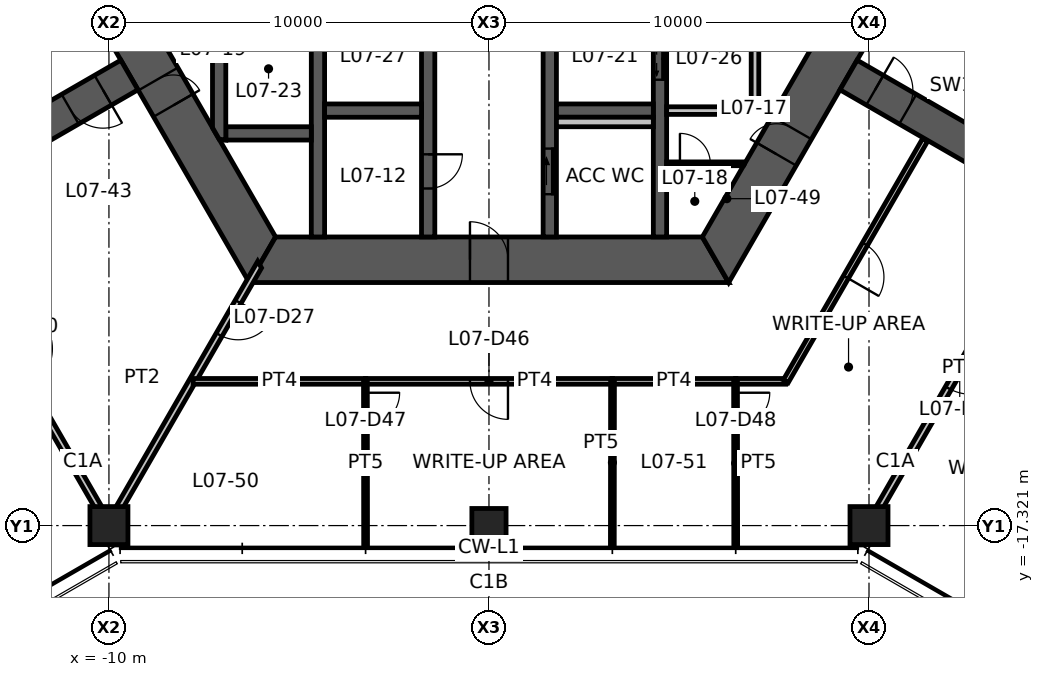
"""IFC4 building model, lengths in metres.
Left out: names, types, materials, properties, quantities, classifications, styles, units other than length and angle.
Written with IfcOpenShell. Run it as: python <this file> out.ifc"""

import sys

from ifc_helpers import new_model, si_unit, direction, frame, frame_2d, origin, origin_2d, place, context, subcontext, project, spatial, polyline, rectangle, hollow_rectangle, outline, extrude, element, fill, save


model = new_model("IFC4")
c1 = context("Model", 3, precision=1e-05, world=origin(), true_north=direction((0.0, 1.0)))
c2 = subcontext(c1, "Body", "Model", "MODEL_VIEW")
j1 = project(units=[si_unit("LENGTHUNIT", "METRE"), si_unit("PLANEANGLEUNIT", "RADIAN")], contexts=[c1])
p1 = place(None, origin())
s1 = spatial("IfcSite", under=j1, at=p1, CompositionType="ELEMENT")
p2 = place(p1, origin())
s2 = spatial("IfcBuilding", under=s1, at=p2, CompositionType="ELEMENT")
p3 = place(p2, frame((0.0, 0.0, 26.8)))
s3 = spatial("IfcBuildingStorey", under=s2, at=p3, CompositionType="ELEMENT", Elevation=26.8)
for number, where, z_axis, x_axis in (
    (1, (-10.0, -17.321, 0.0), (0.0, 0.0, 1.0), (1.0, 0.0, 0.0)),
    (2, (10.0, -17.321, 0.0), (0.0, 0.0, 1.0), (1.0, 0.0, 0.0)),
):
    element("IfcColumn", number, at=place(p3, frame(where, z_axis=z_axis, x_axis=x_axis)), inside=s3, PredefinedType="COLUMN", context=c2, shape_type="SweptSolid", body=[
        extrude(hollow_rectangle(XDim=1.0, YDim=1.0, WallThickness=0.06, at=origin_2d()), origin(), (0.0, 0.0, 1.0), 4.2),
    ])
p4 = place(p3, frame((0.0, -17.321, 0.0), z_axis=(0.0, 0.0, 1.0), x_axis=(1.0, 0.0, 0.0)))
e3 = element("IfcColumn", 3, at=p4, inside=s3, PredefinedType="COLUMN", context=c2, shape_type="SweptSolid", body=[
    extrude(hollow_rectangle(XDim=0.9, YDim=0.9, WallThickness=0.05, at=origin_2d()), origin(), (0.0, 0.0, 1.0), 4.2),
])
p5 = place(p3, frame((-11.922, 0.0, 0.0), z_axis=(0.0, 0.0, 1.0), x_axis=(0.500004296715, -0.866022923061, 0.0)))
e4 = element("IfcWall", 4, at=p5, inside=s3, PredefinedType="SHEAR", context=c2, shape_type="SweptSolid", body=[
    extrude(outline(polyline([(-0.346, -0.6), (6.431, -0.6), (7.231, -0.6), (12.269, -0.6), (11.576, 0.6), (7.231, 0.6), (6.431, 0.6), (0.346, 0.6), (-0.346, -0.6)])), origin(), (0.0, 0.0, 1.0), 4.2),
])
p6 = place(p5, frame((6.431, 0.0, 0.0)))
e5 = element("IfcOpeningElement", 5, at=p6, cuts=e4, PredefinedType="OPENING", context=c2, shape_type="SweptSolid", body=[
    extrude(rectangle(XDim=0.8, YDim=2.1, at=frame_2d((0.4, 1.05))), frame((0.0, 0.61, 0.0), z_axis=(0.0, -1.0, 0.0), x_axis=(1.0, 0.0, 0.0)), (0.0, 0.0, 1.0), 1.22),
])
p7 = place(p3, frame((-5.961, -10.325, 0.0), z_axis=(0.0, 0.0, 1.0), x_axis=(1.0, 0.0, 0.0)))
e6 = element("IfcWall", 6, at=p7, inside=s3, PredefinedType="SHEAR", context=c2, shape_type="SweptSolid", body=[
    extrude(outline(polyline([(-0.346, -0.6), (5.461, -0.6), (6.461, -0.6), (12.269, -0.6), (11.576, 0.6), (6.461, 0.6), (5.461, 0.6), (0.346, 0.6), (-0.346, -0.6)])), origin(), (0.0, 0.0, 1.0), 4.2),
])
p8 = place(p7, frame((5.461, 0.0, 0.0)))
e7 = element("IfcOpeningElement", 7, at=p8, cuts=e6, PredefinedType="OPENING", context=c2, shape_type="SweptSolid", body=[
    extrude(rectangle(XDim=1.0, YDim=2.1, at=frame_2d((0.5, 1.05))), frame((0.0, 0.61, 0.0), z_axis=(0.0, -1.0, 0.0), x_axis=(1.0, 0.0, 0.0)), (0.0, 0.0, 1.0), 1.22),
])
p9 = place(p3, frame((5.961, -10.325, 0.0), z_axis=(0.0, 0.0, 1.0), x_axis=(0.500004296715, 0.866022923061, 0.0)))
e8 = element("IfcWall", 8, at=p9, inside=s3, PredefinedType="SHEAR", context=c2, shape_type="SweptSolid", body=[
    extrude(outline(polyline([(-0.346, -0.6), (3.208, -0.6), (4.009, -0.6), (12.269, -0.6), (11.576, 0.6), (4.009, 0.6), (3.208, 0.6), (0.346, 0.6), (-0.346, -0.6)])), origin(), (0.0, 0.0, 1.0), 4.2),
])
p10 = place(p9, frame((3.208, 0.0, 0.0)))
e9 = element("IfcOpeningElement", 9, at=p10, cuts=e8, PredefinedType="OPENING", context=c2, shape_type="SweptSolid", body=[
    extrude(rectangle(XDim=0.8, YDim=2.1, at=frame_2d((0.4, 1.05))), frame((0.0, 0.61, 0.0), z_axis=(0.0, -1.0, 0.0), x_axis=(1.0, 0.0, 0.0)), (0.0, 0.0, 1.0), 1.22),
])
p11 = place(p3, frame((-9.461, -5.462, 0.0), z_axis=(0.0, 0.0, 1.0), x_axis=(-0.866019116917, -0.500010889016, 0.0)))
e10 = element("IfcWall", 10, at=p11, inside=s3, PredefinedType="SHEAR", context=c2, shape_type="SweptSolid", body=[
    extrude(rectangle(XDim=7.595, YDim=0.9, at=frame_2d((3.798, 0.0))), origin(), (0.0, 0.0, 1.0), 4.2),
])
p12 = place(p11, frame((0.8, 0.0, 0.0)))
e11 = element("IfcOpeningElement", 11, at=p12, cuts=e10, PredefinedType="OPENING", context=c2, shape_type="SweptSolid", body=[
    extrude(rectangle(XDim=1.0, YDim=2.1, at=frame_2d((0.5, 1.05))), frame((0.0, 0.46, 0.0), z_axis=(0.0, -1.0, 0.0), x_axis=(1.0, 0.0, 0.0)), (0.0, 0.0, 1.0), 0.92),
])
p13 = place(p3, frame((9.461, -5.462, 0.0), z_axis=(0.0, 0.0, 1.0), x_axis=(0.866019116917, -0.500010889016, 0.0)))
e12 = element("IfcWall", 12, at=p13, inside=s3, PredefinedType="SHEAR", context=c2, shape_type="SweptSolid", body=[
    extrude(rectangle(XDim=7.595, YDim=0.9, at=frame_2d((3.798, 0.0))), origin(), (0.0, 0.0, 1.0), 4.2),
])
p14 = place(p13, frame((0.8, 0.0, 0.0)))
e13 = element("IfcOpeningElement", 13, at=p14, cuts=e12, PredefinedType="OPENING", context=c2, shape_type="SweptSolid", body=[
    extrude(rectangle(XDim=1.0, YDim=2.1, at=frame_2d((0.5, 1.05))), frame((0.0, 0.46, 0.0), z_axis=(0.0, -1.0, 0.0), x_axis=(1.0, 0.0, 0.0)), (0.0, 0.0, 1.0), 0.92),
])
p15 = place(p3, frame((-1.6, -3.775, 0.0), z_axis=(0.0, 0.0, 1.0), x_axis=(0.0, -1.0, 0.0)))
e14 = element("IfcWall", 14, at=p15, inside=s3, PredefinedType="SHEAR", context=c2, shape_type="SweptSolid", body=[
    extrude(rectangle(XDim=5.95, YDim=0.35, at=frame_2d((2.975, 0.0))), origin(), (0.0, 0.0, 1.0), 4.2),
])
p16 = place(p15, frame((3.775, 0.0, 0.0)))
e15 = element("IfcOpeningElement", 15, at=p16, cuts=e14, PredefinedType="OPENING", context=c2, shape_type="SweptSolid", body=[
    extrude(rectangle(XDim=0.9, YDim=2.1, at=frame_2d((0.45, 1.05))), frame((0.0, 0.185, 0.0), z_axis=(0.0, -1.0, 0.0), x_axis=(1.0, 0.0, 0.0)), (0.0, 0.0, 1.0), 0.37),
])
p17 = place(p3, frame((1.6, -3.775, 0.0), z_axis=(0.0, 0.0, 1.0), x_axis=(0.0, -1.0, 0.0)))
e16 = element("IfcWall", 16, at=p17, inside=s3, PredefinedType="SHEAR", context=c2, shape_type="SweptSolid", body=[
    extrude(rectangle(XDim=5.95, YDim=0.35, at=frame_2d((2.975, 0.0))), origin(), (0.0, 0.0, 1.0), 4.2),
])
p18 = place(p17, frame((3.625, 0.0, 0.0)))
e17 = element("IfcOpeningElement", 17, at=p18, cuts=e16, PredefinedType="OPENING", context=c2, shape_type="SweptSolid", body=[
    extrude(rectangle(XDim=1.2, YDim=2.1, at=frame_2d((0.6, 1.05))), frame((0.0, 0.185, 0.0), z_axis=(0.0, -1.0, 0.0), x_axis=(1.0, 0.0, 0.0)), (0.0, 0.0, 1.0), 0.37),
])
p19 = place(p3, frame((-4.5, -3.775, 0.0), z_axis=(0.0, 0.0, 1.0), x_axis=(0.0, -1.0, 0.0)))
e18 = element("IfcWall", 18, at=p19, inside=s3, PredefinedType="SHEAR", context=c2, shape_type="SweptSolid", body=[
    extrude(rectangle(XDim=5.95, YDim=0.35, at=frame_2d((2.975, 0.0))), origin(), (0.0, 0.0, 1.0), 4.2),
])
p20 = place(p3, frame((4.5, -3.775, 0.0), z_axis=(0.0, 0.0, 1.0), x_axis=(0.0, -1.0, 0.0)))
e19 = element("IfcWall", 19, at=p20, inside=s3, PredefinedType="SHEAR", context=c2, shape_type="SweptSolid", body=[
    extrude(rectangle(XDim=5.95, YDim=0.35, at=frame_2d((2.975, 0.0))), origin(), (0.0, 0.0, 1.0), 4.2),
])
p21 = place(p20, frame((0.712, 0.0, 0.0)))
e20 = element("IfcOpeningElement", 20, at=p21, cuts=e19, PredefinedType="OPENING", context=c2, shape_type="SweptSolid", body=[
    extrude(rectangle(XDim=1.1, YDim=2.1, at=frame_2d((0.55, 1.05))), frame((0.0, 0.185, 0.0), z_axis=(0.0, -1.0, 0.0), x_axis=(1.0, 0.0, 0.0)), (0.0, 0.0, 1.0), 0.37),
])
for number, where, z_axis, x_axis in (
    (21, (-4.325, -6.4, 0.0), (0.0, 0.0, 1.0), (1.0, 0.0, 0.0)),
    (22, (1.775, -6.4, 0.0), (0.0, 0.0, 1.0), (1.0, 0.0, 0.0)),
):
    element("IfcWall", number, at=place(p3, frame(where, z_axis=z_axis, x_axis=x_axis)), inside=s3, PredefinedType="SHEAR", context=c2, shape_type="SweptSolid", body=[
        extrude(rectangle(XDim=2.55, YDim=0.35, at=frame_2d((1.275, 0.0))), origin(), (0.0, 0.0, 1.0), 4.2),
    ])
p22 = place(p3, frame((-6.925, -7.0, 0.0), z_axis=(0.0, 0.0, 1.0), x_axis=(1.0, 0.0, 0.0)))
e23 = element("IfcWall", 23, at=p22, inside=s3, PredefinedType="SHEAR", context=c2, shape_type="SweptSolid", body=[
    extrude(rectangle(XDim=2.25, YDim=0.35, at=frame_2d((1.125, 0.0))), origin(), (0.0, 0.0, 1.0), 4.2),
])
p23 = place(p3, frame((-7.1, -3.775, 0.0), z_axis=(0.0, 0.0, 1.0), x_axis=(0.0, -1.0, 0.0)))
e24 = element("IfcWall", 24, at=p23, inside=s3, PredefinedType="SHEAR", context=c2, shape_type="SweptSolid", body=[
    extrude(outline(polyline([(0.0, -0.175), (3.074, -0.175), (3.377, 0.0), (3.4, 0.175), (0.0, 0.175), (0.0, -0.175)])), origin(), (0.0, 0.0, 1.0), 4.2),
])
p24 = place(p3, frame((4.675, -6.4, 0.0), z_axis=(0.0, 0.0, 1.0), x_axis=(1.0, 0.0, 0.0)))
e25 = element("IfcWall", 25, at=p24, inside=s3, PredefinedType="STANDARD", context=c2, shape_type="SweptSolid", body=[
    extrude(rectangle(XDim=2.425, YDim=0.2, at=frame_2d((1.212, 0.0))), origin(), (0.0, 0.0, 1.0), 4.2),
])
p25 = place(p3, frame((7.0, -3.775, 0.0), z_axis=(0.0, 0.0, 1.0), x_axis=(0.0, -1.0, 0.0)))
e26 = element("IfcWall", 26, at=p25, inside=s3, PredefinedType="STANDARD", context=c2, shape_type="SweptSolid", body=[
    extrude(rectangle(XDim=2.525, YDim=0.2, at=frame_2d((1.263, 0.0))), origin(), (0.0, 0.0, 1.0), 4.2),
])
p26 = place(p3, frame((1.775, -6.7, 0.0), z_axis=(0.0, 0.0, 1.0), x_axis=(1.0, 0.0, 0.0)))
e27 = element("IfcWall", 27, at=p26, inside=s3, PredefinedType="PLUMBINGWALL", context=c2, shape_type="SweptSolid", body=[
    extrude(rectangle(XDim=2.55, YDim=0.25, at=frame_2d((1.275, 0.0))), origin(), (0.0, 0.0, 1.0), 4.2),
])
p27 = place(p3, frame((4.675, -7.8, 0.0), z_axis=(0.0, 0.0, 1.0), x_axis=(1.0, 0.0, 0.0)))
e28 = element("IfcWall", 28, at=p27, inside=s3, PredefinedType="PARTITIONING", context=c2, shape_type="SweptSolid", body=[
    extrude(outline(polyline([(0.0, -0.05), (0.35, -0.05), (1.15, -0.05), (2.022, -0.05), (2.051, 0.0), (2.057, 0.05), (1.15, 0.05), (0.35, 0.05), (0.0, 0.05), (0.0, -0.05)])), origin(), (0.0, 0.0, 1.0), 3.23),
])
p28 = place(p27, frame((0.35, 0.0, 0.0)))
e29 = element("IfcOpeningElement", 29, at=p28, cuts=e28, PredefinedType="OPENING", context=c2, shape_type="SweptSolid", body=[
    extrude(rectangle(XDim=0.8, YDim=2.1, at=frame_2d((0.4, 1.05))), frame((0.0, 0.06, 0.0), z_axis=(0.0, -1.0, 0.0), x_axis=(1.0, 0.0, 0.0)), (0.0, 0.0, 1.0), 0.12),
])
p29 = place(p3, frame((-6.035, -10.453, 0.0), z_axis=(0.0, 0.0, 1.0), x_axis=(-0.499993402427, -0.866029212861, 0.0)))
e30 = element("IfcWall", 30, at=p29, inside=s3, PredefinedType="PARTITIONING", context=c2, shape_type="SweptSolid", body=[
    extrude(outline(polyline([(-0.051, -0.087), (1.129, -0.087), (2.129, -0.087), (7.93, -0.087), (7.93, 0.087), (2.129, 0.087), (1.129, 0.087), (0.051, 0.087), (-0.051, -0.087)])), origin(), (0.0, 0.0, 1.0), 3.33),
])
p30 = place(p29, frame((1.129, 0.0, 0.0)))
e31 = element("IfcOpeningElement", 31, at=p30, cuts=e30, PredefinedType="OPENING", context=c2, shape_type="SweptSolid", body=[
    extrude(rectangle(XDim=1.0, YDim=2.1, at=frame_2d((0.5, 1.05))), frame((0.0, 0.098, 0.0), z_axis=(0.0, -1.0, 0.0), x_axis=(1.0, 0.0, 0.0)), (0.0, 0.0, 1.0), 0.195),
])
p31 = place(p3, frame((-14.775, -9.05, 0.0), z_axis=(0.0, 0.0, 1.0), x_axis=(0.499993908199, -0.866028920859, 0.0)))
e32 = element("IfcWall", 32, at=p31, inside=s3, PredefinedType="PARTITIONING", context=c2, shape_type="SweptSolid", body=[
    extrude(rectangle(XDim=9.55, YDim=0.175, at=frame_2d((4.775, 0.0))), origin(), (0.0, 0.0, 1.0), 3.238),
])
p32 = place(p31, frame((4.175, 0.0, 0.0)))
e33 = element("IfcOpeningElement", 33, at=p32, cuts=e32, PredefinedType="OPENING", context=c2, shape_type="SweptSolid", body=[
    extrude(rectangle(XDim=1.2, YDim=2.1, at=frame_2d((0.6, 1.05))), frame((0.0, 0.098, 0.0), z_axis=(0.0, -1.0, 0.0), x_axis=(1.0, 0.0, 0.0)), (0.0, 0.0, 1.0), 0.195),
])
p33 = place(p3, frame((14.775, -9.05, 0.0), z_axis=(0.0, 0.0, 1.0), x_axis=(-0.499993908199, -0.866028920859, 0.0)))
e34 = element("IfcWall", 34, at=p33, inside=s3, PredefinedType="PARTITIONING", context=c2, shape_type="SweptSolid", body=[
    extrude(rectangle(XDim=9.55, YDim=0.175, at=frame_2d((4.775, 0.0))), origin(), (0.0, 0.0, 1.0), 3.238),
])
p34 = place(p33, frame((4.175, 0.0, 0.0)))
e35 = element("IfcOpeningElement", 35, at=p34, cuts=e34, PredefinedType="OPENING", context=c2, shape_type="SweptSolid", body=[
    extrude(rectangle(XDim=1.2, YDim=2.1, at=frame_2d((0.6, 1.05))), frame((0.0, 0.098, 0.0), z_axis=(0.0, -1.0, 0.0), x_axis=(1.0, 0.0, 0.0)), (0.0, 0.0, 1.0), 0.195),
])
p35 = place(p3, frame((-3.241, -13.525, 0.0), z_axis=(0.0, 0.0, 1.0), x_axis=(-1.0, 0.0, 0.0)))
e36 = element("IfcWall", 36, at=p35, inside=s3, PredefinedType="PARTITIONING", context=c2, shape_type="SweptSolid", body=[
    extrude(rectangle(XDim=4.544, YDim=0.15, at=frame_2d((2.272, 0.0))), origin(), (0.0, 0.0, 1.0), 3.23),
])
p36 = place(p3, frame((6.498, -13.525, 0.0), z_axis=(0.0, 0.0, 1.0), x_axis=(-1.0, 0.0, 0.0)))
e37 = element("IfcWall", 37, at=p36, inside=s3, PredefinedType="PARTITIONING", context=c2, shape_type="SweptSolid", body=[
    extrude(rectangle(XDim=3.256, YDim=0.15, at=frame_2d((1.628, 0.0))), origin(), (0.0, 0.0, 1.0), 3.23),
])
p37 = place(p3, frame((7.809, -13.525, 0.0), z_axis=(0.0, 0.0, 1.0), x_axis=(-1.0, 0.0, 0.0)))
e38 = element("IfcWall", 38, at=p37, inside=s3, PredefinedType="PARTITIONING", context=c2, shape_type="SweptSolid", body=[
    extrude(rectangle(XDim=1.32, YDim=0.15, at=frame_2d((0.66, 0.0))), origin(), (0.0, 0.0, 1.0), 3.23),
])
p38 = place(p3, frame((11.478, -7.169, 0.0), z_axis=(0.0, 0.0, 1.0), x_axis=(-0.500010424145, -0.866019385318, 0.0)))
e39 = element("IfcWall", 39, at=p38, inside=s3, PredefinedType="PARTITIONING", context=c2, shape_type="SweptSolid", body=[
    extrude(rectangle(XDim=7.339, YDim=0.15, at=frame_2d((3.669, 0.0))), origin(), (0.0, 0.0, 1.0), 3.23),
])
p39 = place(p38, frame((3.169, 0.0, 0.0)))
e40 = element("IfcOpeningElement", 40, at=p39, cuts=e39, PredefinedType="OPENING", context=c2, shape_type="SweptSolid", body=[
    extrude(rectangle(XDim=1.0, YDim=2.1, at=frame_2d((0.5, 1.05))), frame((0.0, 0.085, 0.0), z_axis=(0.0, -1.0, 0.0), x_axis=(1.0, 0.0, 0.0)), (0.0, 0.0, 1.0), 0.17),
])
p40 = place(p3, frame((3.251, -13.525, 0.0), z_axis=(0.0, 0.0, 1.0), x_axis=(-1.0, 0.0, 0.0)))
e41 = element("IfcWall", 41, at=p40, inside=s3, PredefinedType="PARTITIONING", context=c2, shape_type="SweptSolid", body=[
    extrude(rectangle(XDim=6.502, YDim=0.15, at=frame_2d((3.251, 0.0))), origin(), (0.0, 0.0, 1.0), 3.23),
])
p41 = place(p40, frame((2.751, 0.0, 0.0)))
e42 = element("IfcOpeningElement", 42, at=p41, cuts=e41, PredefinedType="OPENING", context=c2, shape_type="SweptSolid", body=[
    extrude(rectangle(XDim=1.0, YDim=2.1, at=frame_2d((0.5, 1.05))), frame((0.0, 0.085, 0.0), z_axis=(0.0, -1.0, 0.0), x_axis=(1.0, 0.0, 0.0)), (0.0, 0.0, 1.0), 0.17),
])
p42 = place(p3, frame((-3.251, -13.525, 0.0), z_axis=(0.0, 0.0, 1.0), x_axis=(0.001076120809, -0.999999420982, 0.0)))
e43 = element("IfcWall", 43, at=p42, inside=s3, PredefinedType="PARTITIONING", context=c2, shape_type="SweptSolid", body=[
    extrude(rectangle(XDim=4.311, YDim=0.1, at=frame_2d((2.155, 0.0))), origin(), (0.0, 0.0, 1.0), 3.23),
])
p43 = place(p42, frame((0.3, 0.0, 0.0)))
e44 = element("IfcOpeningElement", 44, at=p43, cuts=e43, PredefinedType="OPENING", context=c2, shape_type="SweptSolid", body=[
    extrude(rectangle(XDim=0.9, YDim=2.1, at=frame_2d((0.45, 1.05))), frame((0.0, 0.06, 0.0), z_axis=(0.0, -1.0, 0.0), x_axis=(1.0, 0.0, 0.0)), (0.0, 0.0, 1.0), 0.12),
])
p44 = place(p3, frame((6.488, -13.525, 0.0), z_axis=(0.0, 0.0, 1.0), x_axis=(0.001076120809, -0.999999420982, 0.0)))
e45 = element("IfcWall", 45, at=p44, inside=s3, PredefinedType="PARTITIONING", context=c2, shape_type="SweptSolid", body=[
    extrude(rectangle(XDim=4.311, YDim=0.1, at=frame_2d((2.155, 0.0))), origin(), (0.0, 0.0, 1.0), 3.23),
])
p45 = place(p44, frame((0.3, 0.0, 0.0)))
e46 = element("IfcOpeningElement", 46, at=p45, cuts=e45, PredefinedType="OPENING", context=c2, shape_type="SweptSolid", body=[
    extrude(rectangle(XDim=0.9, YDim=2.1, at=frame_2d((0.45, 1.05))), frame((0.0, 0.06, 0.0), z_axis=(0.0, -1.0, 0.0), x_axis=(1.0, 0.0, 0.0)), (0.0, 0.0, 1.0), 0.12),
])
p46 = place(p3, frame((3.246, -17.801, 0.0), z_axis=(0.0, 0.0, 1.0), x_axis=(0.001084907715, 0.999999411487, 0.0)))
e47 = element("IfcWall", 47, at=p46, inside=s3, PredefinedType="PARTITIONING", context=c2, shape_type="SweptSolid", body=[
    extrude(rectangle(XDim=4.276, YDim=0.1, at=frame_2d((2.138, 0.0))), origin(), (0.0, 0.0, 1.0), 3.23),
])
p47 = place(p8, origin())
e48 = element("IfcDoor", 48, at=p47, inside=s3, OperationType="SINGLE_SWING_LEFT", PredefinedType="DOOR", context=c2, shape_type="SweptSolid", body=[
    extrude(rectangle(XDim=1.0, YDim=2.1, at=frame_2d((0.5, 1.05))), frame((0.0, 0.025, 0.0), z_axis=(0.0, -1.0, 0.0), x_axis=(1.0, 0.0, 0.0)), (0.0, 0.0, 1.0), 0.05),
])
fill(e7, e48)
p48 = place(p10, origin())
e49 = element("IfcDoor", 49, at=p48, inside=s3, OperationType="SINGLE_SWING_LEFT", PredefinedType="DOOR", context=c2, shape_type="SweptSolid", body=[
    extrude(rectangle(XDim=0.8, YDim=2.1, at=frame_2d((0.4, 1.05))), frame((0.0, 0.025, 0.0), z_axis=(0.0, -1.0, 0.0), x_axis=(1.0, 0.0, 0.0)), (0.0, 0.0, 1.0), 0.05),
])
fill(e9, e49)
p49 = place(p6, origin())
e50 = element("IfcDoor", 50, at=p49, inside=s3, OperationType="SINGLE_SWING_RIGHT", PredefinedType="DOOR", context=c2, shape_type="SweptSolid", body=[
    extrude(rectangle(XDim=0.8, YDim=2.1, at=frame_2d((0.4, 1.05))), frame((0.0, 0.025, 0.0), z_axis=(0.0, -1.0, 0.0), x_axis=(1.0, 0.0, 0.0)), (0.0, 0.0, 1.0), 0.05),
])
fill(e5, e50)
p50 = place(p18, origin())
e51 = element("IfcDoor", 51, at=p50, inside=s3, OperationType="SLIDING_TO_LEFT", PredefinedType="DOOR", context=c2, shape_type="SweptSolid", body=[
    extrude(rectangle(XDim=1.2, YDim=2.1, at=frame_2d((0.6, 1.05))), frame((0.0, 0.025, 0.0), z_axis=(0.0, -1.0, 0.0), x_axis=(1.0, 0.0, 0.0)), (0.0, 0.0, 1.0), 0.05),
])
fill(e17, e51)
p51 = place(p16, origin())
e52 = element("IfcDoor", 52, at=p51, inside=s3, OperationType="SINGLE_SWING_LEFT", PredefinedType="DOOR", context=c2, shape_type="SweptSolid", body=[
    extrude(rectangle(XDim=0.9, YDim=2.1, at=frame_2d((0.45, 1.05))), frame((0.0, 0.025, 0.0), z_axis=(0.0, -1.0, 0.0), x_axis=(1.0, 0.0, 0.0)), (0.0, 0.0, 1.0), 0.05),
])
fill(e15, e52)
p52 = place(p12, origin())
e53 = element("IfcDoor", 53, at=p52, inside=s3, OperationType="SINGLE_SWING_LEFT", PredefinedType="DOOR", context=c2, shape_type="SweptSolid", body=[
    extrude(rectangle(XDim=1.0, YDim=2.1, at=frame_2d((0.5, 1.05))), frame((0.0, 0.025, 0.0), z_axis=(0.0, -1.0, 0.0), x_axis=(1.0, 0.0, 0.0)), (0.0, 0.0, 1.0), 0.05),
])
fill(e11, e53)
p53 = place(p14, origin())
e54 = element("IfcDoor", 54, at=p53, inside=s3, OperationType="SINGLE_SWING_LEFT", PredefinedType="DOOR", context=c2, shape_type="SweptSolid", body=[
    extrude(rectangle(XDim=1.0, YDim=2.1, at=frame_2d((0.5, 1.05))), frame((0.0, 0.025, 0.0), z_axis=(0.0, -1.0, 0.0), x_axis=(1.0, 0.0, 0.0)), (0.0, 0.0, 1.0), 0.05),
])
fill(e13, e54)
p54 = place(p28, origin())
e55 = element("IfcDoor", 55, at=p54, inside=s3, OperationType="SINGLE_SWING_LEFT", PredefinedType="DOOR", context=c2, shape_type="SweptSolid", body=[
    extrude(rectangle(XDim=0.8, YDim=2.1, at=frame_2d((0.4, 1.05))), frame((0.0, 0.025, 0.0), z_axis=(0.0, -1.0, 0.0), x_axis=(1.0, 0.0, 0.0)), (0.0, 0.0, 1.0), 0.05),
])
fill(e29, e55)
p55 = place(p30, origin())
e56 = element("IfcDoor", 56, at=p55, inside=s3, OperationType="SINGLE_SWING_LEFT", PredefinedType="DOOR", context=c2, shape_type="SweptSolid", body=[
    extrude(rectangle(XDim=1.0, YDim=2.1, at=frame_2d((0.5, 1.05))), frame((0.0, 0.025, 0.0), z_axis=(0.0, -1.0, 0.0), x_axis=(1.0, 0.0, 0.0)), (0.0, 0.0, 1.0), 0.05),
])
fill(e31, e56)
p56 = place(p34, origin())
e57 = element("IfcDoor", 57, at=p56, inside=s3, OperationType="DOUBLE_DOOR_SINGLE_SWING", PredefinedType="DOOR", context=c2, shape_type="SweptSolid", body=[
    extrude(rectangle(XDim=1.2, YDim=2.1, at=frame_2d((0.6, 1.05))), frame((0.0, 0.025, 0.0), z_axis=(0.0, -1.0, 0.0), x_axis=(1.0, 0.0, 0.0)), (0.0, 0.0, 1.0), 0.05),
])
fill(e35, e57)
p57 = place(p39, origin())
e58 = element("IfcDoor", 58, at=p57, inside=s3, OperationType="SINGLE_SWING_RIGHT", PredefinedType="DOOR", context=c2, shape_type="SweptSolid", body=[
    extrude(rectangle(XDim=1.0, YDim=2.1, at=frame_2d((0.5, 1.05))), frame((0.0, 0.025, 0.0), z_axis=(0.0, -1.0, 0.0), x_axis=(1.0, 0.0, 0.0)), (0.0, 0.0, 1.0), 0.05),
])
fill(e40, e58)
p58 = place(p41, origin())
e59 = element("IfcDoor", 59, at=p58, inside=s3, OperationType="SINGLE_SWING_LEFT", PredefinedType="DOOR", context=c2, shape_type="SweptSolid", body=[
    extrude(rectangle(XDim=1.0, YDim=2.1, at=frame_2d((0.5, 1.05))), frame((0.0, 0.025, 0.0), z_axis=(0.0, -1.0, 0.0), x_axis=(1.0, 0.0, 0.0)), (0.0, 0.0, 1.0), 0.05),
])
fill(e42, e59)
p59 = place(p43, origin())
e60 = element("IfcDoor", 60, at=p59, inside=s3, OperationType="SINGLE_SWING_LEFT", PredefinedType="DOOR", context=c2, shape_type="SweptSolid", body=[
    extrude(rectangle(XDim=0.9, YDim=2.1, at=frame_2d((0.45, 1.05))), frame((0.0, 0.025, 0.0), z_axis=(0.0, -1.0, 0.0), x_axis=(1.0, 0.0, 0.0)), (0.0, 0.0, 1.0), 0.05),
])
fill(e44, e60)
p60 = place(p45, origin())
e61 = element("IfcDoor", 61, at=p60, inside=s3, OperationType="SINGLE_SWING_LEFT", PredefinedType="DOOR", context=c2, shape_type="SweptSolid", body=[
    extrude(rectangle(XDim=0.9, YDim=2.1, at=frame_2d((0.45, 1.05))), frame((0.0, 0.025, 0.0), z_axis=(0.0, -1.0, 0.0), x_axis=(1.0, 0.0, 0.0)), (0.0, 0.0, 1.0), 0.05),
])
fill(e46, e61)
p61 = place(p21, origin())
e62 = element("IfcDoor", 62, at=p61, inside=s3, OperationType="DOUBLE_DOOR_SLIDING", PredefinedType="DOOR", context=c2, shape_type="SweptSolid", body=[
    extrude(rectangle(XDim=1.1, YDim=2.1, at=frame_2d((0.55, 1.05))), frame((0.0, 0.025, 0.0), z_axis=(0.0, -1.0, 0.0), x_axis=(1.0, 0.0, 0.0)), (0.0, 0.0, 1.0), 0.05),
])
fill(e20, e62)
save(model, sys.argv[1])
